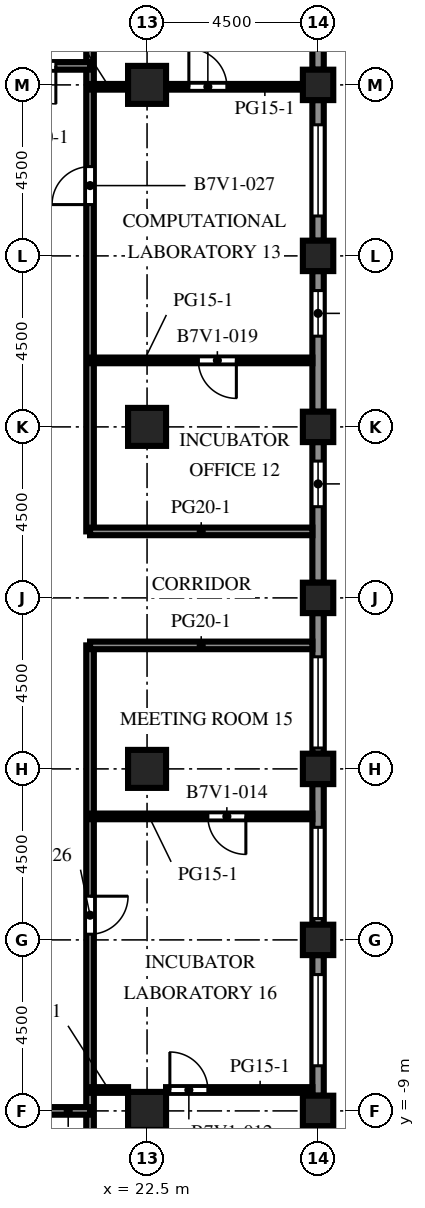
"""IFC4 building model, lengths in metres.
Left out: names, types, materials, properties, quantities, classifications, styles, units other than length and angle.
Written with IfcOpenShell. Run it as: python <this file> out.ifc"""

import sys

from ifc_helpers import new_model, si_unit, direction, frame, frame_2d, origin, origin_2d, place, context, subcontext, project, spatial, rectangle, extrude, element, fill, save


model = new_model("IFC4")
c1 = context("Model", 3, precision=1e-05, world=origin(), true_north=direction((0.0, 1.0)))
c2 = subcontext(c1, "Body", "Model", "MODEL_VIEW")
j1 = project(units=[si_unit("LENGTHUNIT", "METRE"), si_unit("PLANEANGLEUNIT", "RADIAN")], contexts=[c1])
p1 = place(None, origin())
s1 = spatial("IfcSite", under=j1, at=p1, CompositionType="ELEMENT")
p2 = place(p1, origin())
s2 = spatial("IfcBuilding", under=s1, at=p2, CompositionType="ELEMENT")
p3 = place(p2, frame((0.0, 0.0, 252.1)))
s3 = spatial("IfcBuildingStorey", under=s2, at=p3, CompositionType="ELEMENT", Elevation=252.1)
for number, where, z_axis, x_axis in (
    (1, (27.0, -9.0, 0.0), (0.0, 0.0, 1.0), (1.0, 0.0, 0.0)),
    (2, (27.0, -4.5, 0.0), (0.0, 0.0, 1.0), (1.0, 0.0, 0.0)),
    (3, (27.0, 0.0, 0.0), (0.0, 0.0, 1.0), (1.0, 0.0, 0.0)),
    (4, (27.0, 4.5, 0.0), (0.0, 0.0, 1.0), (1.0, 0.0, 0.0)),
    (5, (27.0, 9.0, 0.0), (0.0, 0.0, 1.0), (1.0, 0.0, 0.0)),
    (6, (27.0, 13.5, 0.0), (0.0, 0.0, 1.0), (1.0, 0.0, 0.0)),
    (7, (27.0, 18.0, 0.0), (0.0, 0.0, 1.0), (1.0, 0.0, 0.0)),
):
    element("IfcColumn", number, at=place(p3, frame(where, z_axis=z_axis, x_axis=x_axis)), inside=s3, PredefinedType="COLUMN", context=c2, shape_type="SweptSolid", body=[
        extrude(rectangle(XDim=0.8, YDim=0.8, at=origin_2d()), origin(), (0.0, 0.0, 1.0), 4.1),
    ])
for number, where, z_axis, x_axis in (
    (8, (22.5, -9.0, 0.0), (0.0, 0.0, 1.0), (1.0, 0.0, 0.0)),
    (9, (22.5, 0.0, 0.0), (0.0, 0.0, 1.0), (1.0, 0.0, 0.0)),
    (10, (22.5, 9.0, 0.0), (0.0, 0.0, 1.0), (1.0, 0.0, 0.0)),
    (11, (22.5, 18.0, 0.0), (0.0, 0.0, 1.0), (1.0, 0.0, 0.0)),
):
    element("IfcColumn", number, at=place(p3, frame(where, z_axis=z_axis, x_axis=x_axis)), inside=s3, PredefinedType="COLUMN", context=c2, shape_type="SweptSolid", body=[
        extrude(rectangle(XDim=1.0, YDim=1.0, at=origin_2d()), origin(), (0.0, 0.0, 1.0), 4.1),
    ])
p4 = place(p3, frame((27.0, -9.4, 0.0), z_axis=(0.0, 0.0, 1.0), x_axis=(0.0, -1.0, 0.0)))
e12 = element("IfcWall", 12, at=p4, inside=s3, PredefinedType="SOLIDWALL", context=c2, shape_type="SweptSolid", body=[
    extrude(rectangle(XDim=3.7, YDim=0.3, at=frame_2d((1.85, 0.0))), origin(), (0.0, 0.0, 1.0), 2.85),
])
p5 = place(p4, frame((1.35, 0.0, 0.0)))
e13 = element("IfcOpeningElement", 13, at=p5, cuts=e12, PredefinedType="OPENING", context=c2, shape_type="SweptSolid", body=[
    extrude(rectangle(XDim=1.0, YDim=2.2, at=frame_2d((0.5, 1.1))), frame((0.0, 0.16, 0.0), z_axis=(0.0, -1.0, 0.0), x_axis=(1.0, 0.0, 0.0)), (0.0, 0.0, 1.0), 0.32),
])
p6 = place(p3, frame((27.0, -4.9, 0.0), z_axis=(0.0, 0.0, 1.0), x_axis=(0.0, -1.0, 0.0)))
e14 = element("IfcWall", 14, at=p6, inside=s3, PredefinedType="SOLIDWALL", context=c2, shape_type="SweptSolid", body=[
    extrude(rectangle(XDim=3.7, YDim=0.3, at=frame_2d((1.85, 0.0))), origin(), (0.0, 0.0, 1.0), 2.85),
])
p7 = place(p6, frame((0.512, 0.0, 0.8)))
e15 = element("IfcOpeningElement", 15, at=p7, cuts=e14, PredefinedType="OPENING", context=c2, shape_type="SweptSolid", body=[
    extrude(rectangle(XDim=2.4, YDim=1.7, at=frame_2d((1.2, 0.85))), frame((0.0, 0.16, 0.0), z_axis=(0.0, -1.0, 0.0), x_axis=(1.0, 0.0, 0.0)), (0.0, 0.0, 1.0), 0.32),
])
p8 = place(p3, frame((27.0, -0.4, 0.0), z_axis=(0.0, 0.0, 1.0), x_axis=(0.0, -1.0, 0.0)))
e16 = element("IfcWall", 16, at=p8, inside=s3, PredefinedType="SOLIDWALL", context=c2, shape_type="SweptSolid", body=[
    extrude(rectangle(XDim=3.7, YDim=0.3, at=frame_2d((1.85, 0.0))), origin(), (0.0, 0.0, 1.0), 2.85),
])
p9 = place(p8, frame((1.137, 0.0, 0.8)))
e17 = element("IfcOpeningElement", 17, at=p9, cuts=e16, PredefinedType="OPENING", context=c2, shape_type="SweptSolid", body=[
    extrude(rectangle(XDim=2.4, YDim=1.7, at=frame_2d((1.2, 0.85))), frame((0.0, 0.16, 0.0), z_axis=(0.0, -1.0, 0.0), x_axis=(1.0, 0.0, 0.0)), (0.0, 0.0, 1.0), 0.32),
])
p10 = place(p3, frame((27.0, 4.1, 0.0), z_axis=(0.0, 0.0, 1.0), x_axis=(0.0, -1.0, 0.0)))
e18 = element("IfcWall", 18, at=p10, inside=s3, PredefinedType="SOLIDWALL", context=c2, shape_type="SweptSolid", body=[
    extrude(rectangle(XDim=3.7, YDim=0.3, at=frame_2d((1.85, 0.0))), origin(), (0.0, 0.0, 1.0), 2.85),
])
p11 = place(p10, frame((1.15, 0.0, 0.8)))
e19 = element("IfcOpeningElement", 19, at=p11, cuts=e18, PredefinedType="OPENING", context=c2, shape_type="SweptSolid", body=[
    extrude(rectangle(XDim=2.4, YDim=1.7, at=frame_2d((1.2, 0.85))), frame((0.0, 0.16, 0.0), z_axis=(0.0, -1.0, 0.0), x_axis=(1.0, 0.0, 0.0)), (0.0, 0.0, 1.0), 0.32),
])
p12 = place(p3, frame((27.0, 8.6, 0.0), z_axis=(0.0, 0.0, 1.0), x_axis=(0.0, -1.0, 0.0)))
e20 = element("IfcWall", 20, at=p12, inside=s3, PredefinedType="SOLIDWALL", context=c2, shape_type="SweptSolid", body=[
    extrude(rectangle(XDim=3.7, YDim=0.3, at=frame_2d((1.85, 0.0))), origin(), (0.0, 0.0, 1.0), 2.85),
])
p13 = place(p12, frame((0.5, 0.0, 0.8)))
e21 = element("IfcOpeningElement", 21, at=p13, cuts=e20, PredefinedType="OPENING", context=c2, shape_type="SweptSolid", body=[
    extrude(rectangle(XDim=1.2, YDim=1.7, at=frame_2d((0.6, 0.85))), frame((0.0, 0.16, 0.0), z_axis=(0.0, -1.0, 0.0), x_axis=(1.0, 0.0, 0.0)), (0.0, 0.0, 1.0), 0.32),
])
p14 = place(p3, frame((27.0, 13.1, 0.0), z_axis=(0.0, 0.0, 1.0), x_axis=(0.0, -1.0, 0.0)))
e22 = element("IfcWall", 22, at=p14, inside=s3, PredefinedType="SOLIDWALL", context=c2, shape_type="SweptSolid", body=[
    extrude(rectangle(XDim=3.7, YDim=0.3, at=frame_2d((1.85, 0.0))), origin(), (0.0, 0.0, 1.0), 2.85),
])
p15 = place(p14, frame((0.512, 0.0, 0.8)))
e23 = element("IfcOpeningElement", 23, at=p15, cuts=e22, PredefinedType="OPENING", context=c2, shape_type="SweptSolid", body=[
    extrude(rectangle(XDim=1.2, YDim=1.7, at=frame_2d((0.6, 0.85))), frame((0.0, 0.16, 0.0), z_axis=(0.0, -1.0, 0.0), x_axis=(1.0, 0.0, 0.0)), (0.0, 0.0, 1.0), 0.32),
])
p16 = place(p3, frame((27.0, 17.6, 0.0), z_axis=(0.0, 0.0, 1.0), x_axis=(0.0, -1.0, 0.0)))
e24 = element("IfcWall", 24, at=p16, inside=s3, PredefinedType="SOLIDWALL", context=c2, shape_type="SweptSolid", body=[
    extrude(rectangle(XDim=3.7, YDim=0.3, at=frame_2d((1.85, 0.0))), origin(), (0.0, 0.0, 1.0), 2.85),
])
p17 = place(p16, frame((0.65, 0.0, 0.8)))
e25 = element("IfcOpeningElement", 25, at=p17, cuts=e24, PredefinedType="OPENING", context=c2, shape_type="SweptSolid", body=[
    extrude(rectangle(XDim=2.4, YDim=1.7, at=frame_2d((1.2, 0.85))), frame((0.0, 0.16, 0.0), z_axis=(0.0, -1.0, 0.0), x_axis=(1.0, 0.0, 0.0)), (0.0, 0.0, 1.0), 0.32),
])
p18 = place(p3, frame((27.0, 22.1, 0.0), z_axis=(0.0, 0.0, 1.0), x_axis=(0.0, -1.0, 0.0)))
e26 = element("IfcWall", 26, at=p18, inside=s3, PredefinedType="SOLIDWALL", context=c2, shape_type="SweptSolid", body=[
    extrude(rectangle(XDim=3.7, YDim=0.3, at=frame_2d((1.85, 0.0))), origin(), (0.0, 0.0, 1.0), 2.85),
])
p19 = place(p18, frame((1.35, 0.0, 0.0)))
e27 = element("IfcOpeningElement", 27, at=p19, cuts=e26, PredefinedType="OPENING", context=c2, shape_type="SweptSolid", body=[
    extrude(rectangle(XDim=1.0, YDim=2.2, at=frame_2d((0.5, 1.1))), frame((0.0, 0.16, 0.0), z_axis=(0.0, -1.0, 0.0), x_axis=(1.0, 0.0, 0.0)), (0.0, 0.0, 1.0), 0.32),
])
p20 = place(p3, frame((21.0, 3.25, 0.0), z_axis=(0.0, 0.0, 1.0), x_axis=(0.0, -1.0, 0.0)))
e28 = element("IfcWall", 28, at=p20, inside=s3, PredefinedType="PARTITIONING", context=c2, shape_type="SweptSolid", body=[
    extrude(rectangle(XDim=25.6, YDim=0.2, at=frame_2d((12.8, 0.0))), origin(), (0.0, 0.0, 1.0), 3.65),
])
p21 = place(p20, frame((6.6, 0.0, 0.0)))
e29 = element("IfcOpeningElement", 29, at=p21, cuts=e28, PredefinedType="OPENING", context=c2, shape_type="SweptSolid", body=[
    extrude(rectangle(XDim=1.0, YDim=2.1, at=frame_2d((0.5, 1.05))), frame((0.0, 0.11, 0.0), z_axis=(0.0, -1.0, 0.0), x_axis=(1.0, 0.0, 0.0)), (0.0, 0.0, 1.0), 0.22),
])
p22 = place(p3, frame((21.0, 31.35, 0.0), z_axis=(0.0, 0.0, 1.0), x_axis=(0.0, -1.0, 0.0)))
e30 = element("IfcWall", 30, at=p22, inside=s3, PredefinedType="PARTITIONING", context=c2, shape_type="SweptSolid", body=[
    extrude(rectangle(XDim=25.1, YDim=0.2, at=frame_2d((12.55, 0.0))), origin(), (0.0, 0.0, 1.0), 3.65),
])
p23 = place(p22, frame((15.5, 0.0, 0.0)))
e31 = element("IfcOpeningElement", 31, at=p23, cuts=e30, PredefinedType="OPENING", context=c2, shape_type="SweptSolid", body=[
    extrude(rectangle(XDim=1.0, YDim=2.1, at=frame_2d((0.5, 1.05))), frame((0.0, 0.11, 0.0), z_axis=(0.0, -1.0, 0.0), x_axis=(1.0, 0.0, 0.0)), (0.0, 0.0, 1.0), 0.22),
])
p24 = place(p3, frame((21.0, -9.0, 0.0), z_axis=(0.0, 0.0, 1.0), x_axis=(-1.0, 0.0, 0.0)))
e32 = element("IfcWall", 32, at=p24, inside=s3, PredefinedType="PARTITIONING", context=c2, shape_type="SweptSolid", body=[
    extrude(rectangle(XDim=3.0, YDim=0.2, at=frame_2d((1.5, 0.0))), origin(), (0.0, 0.0, 1.0), 3.65),
])
p25 = place(p24, frame((1.15, 0.0, 0.0)))
e33 = element("IfcOpeningElement", 33, at=p25, cuts=e32, PredefinedType="OPENING", context=c2, shape_type="SweptSolid", body=[
    extrude(rectangle(XDim=1.0, YDim=2.1, at=frame_2d((0.5, 1.05))), frame((0.0, 0.11, 0.0), z_axis=(0.0, -1.0, 0.0), x_axis=(1.0, 0.0, 0.0)), (0.0, 0.0, 1.0), 0.22),
])
p26 = place(p3, frame((21.0, -8.45, 0.0), z_axis=(0.0, 0.0, 1.0), x_axis=(1.0, 0.0, 0.0)))
e34 = element("IfcWall", 34, at=p26, inside=s3, PredefinedType="PARTITIONING", context=c2, shape_type="SweptSolid", body=[
    extrude(rectangle(XDim=1.0, YDim=0.15, at=frame_2d((0.5, 0.0))), origin(), (0.0, 0.0, 1.0), 3.65),
])
p27 = place(p3, frame((26.85, -8.45, 0.0), z_axis=(0.0, 0.0, 1.0), x_axis=(-1.0, 0.0, 0.0)))
e35 = element("IfcWall", 35, at=p27, inside=s3, PredefinedType="PARTITIONING", context=c2, shape_type="SweptSolid", body=[
    extrude(rectangle(XDim=3.85, YDim=0.15, at=frame_2d((1.925, 0.0))), origin(), (0.0, 0.0, 1.0), 3.65),
])
p28 = place(p27, frame((2.75, 0.0, 0.0)))
e36 = element("IfcOpeningElement", 36, at=p28, cuts=e35, PredefinedType="OPENING", context=c2, shape_type="SweptSolid", body=[
    extrude(rectangle(XDim=1.0, YDim=2.1, at=frame_2d((0.5, 1.05))), frame((0.0, 0.085, 0.0), z_axis=(0.0, -1.0, 0.0), x_axis=(1.0, 0.0, 0.0)), (0.0, 0.0, 1.0), 0.17),
])
p29 = place(p3, frame((21.0, -1.25, 0.0), z_axis=(0.0, 0.0, 1.0), x_axis=(1.0, 0.0, 0.0)))
e37 = element("IfcWall", 37, at=p29, inside=s3, PredefinedType="PARTITIONING", context=c2, shape_type="SweptSolid", body=[
    extrude(rectangle(XDim=5.85, YDim=0.15, at=frame_2d((2.925, 0.0))), origin(), (0.0, 0.0, 1.0), 3.65),
])
p30 = place(p29, frame((3.1, 0.0, 0.0)))
e38 = element("IfcOpeningElement", 38, at=p30, cuts=e37, PredefinedType="OPENING", context=c2, shape_type="SweptSolid", body=[
    extrude(rectangle(XDim=1.0, YDim=2.1, at=frame_2d((0.5, 1.05))), frame((0.0, 0.085, 0.0), z_axis=(0.0, -1.0, 0.0), x_axis=(1.0, 0.0, 0.0)), (0.0, 0.0, 1.0), 0.17),
])
for number, where, z_axis, x_axis in (
    (39, (21.0, 3.25, 0.0), (0.0, 0.0, 1.0), (1.0, 0.0, 0.0)),
    (40, (21.0, 6.25, 0.0), (0.0, 0.0, 1.0), (1.0, 0.0, 0.0)),
):
    element("IfcWall", number, at=place(p3, frame(where, z_axis=z_axis, x_axis=x_axis)), inside=s3, PredefinedType="PARTITIONING", context=c2, shape_type="SweptSolid", body=[
        extrude(rectangle(XDim=5.85, YDim=0.2, at=frame_2d((2.925, 0.0))), origin(), (0.0, 0.0, 1.0), 3.65),
    ])
p31 = place(p3, frame((26.85, 10.75, 0.0), z_axis=(0.0, 0.0, 1.0), x_axis=(-1.0, 0.0, 0.0)))
e41 = element("IfcWall", 41, at=p31, inside=s3, PredefinedType="PARTITIONING", context=c2, shape_type="SweptSolid", body=[
    extrude(rectangle(XDim=5.85, YDim=0.15, at=frame_2d((2.925, 0.0))), origin(), (0.0, 0.0, 1.0), 3.65),
])
p32 = place(p31, frame((2.0, 0.0, 0.0)))
e42 = element("IfcOpeningElement", 42, at=p32, cuts=e41, PredefinedType="OPENING", context=c2, shape_type="SweptSolid", body=[
    extrude(rectangle(XDim=1.0, YDim=2.1, at=frame_2d((0.5, 1.05))), frame((0.0, 0.085, 0.0), z_axis=(0.0, -1.0, 0.0), x_axis=(1.0, 0.0, 0.0)), (0.0, 0.0, 1.0), 0.17),
])
p33 = place(p3, frame((21.0, 17.95, 0.0), z_axis=(0.0, 0.0, 1.0), x_axis=(1.0, 0.0, 0.0)))
e43 = element("IfcWall", 43, at=p33, inside=s3, PredefinedType="PARTITIONING", context=c2, shape_type="SweptSolid", body=[
    extrude(rectangle(XDim=1.0, YDim=0.15, at=frame_2d((0.5, 0.0))), origin(), (0.0, 0.0, 1.0), 3.65),
])
p34 = place(p3, frame((23.0, 17.95, 0.0), z_axis=(0.0, 0.0, 1.0), x_axis=(1.0, 0.0, 0.0)))
e44 = element("IfcWall", 44, at=p34, inside=s3, PredefinedType="PARTITIONING", context=c2, shape_type="SweptSolid", body=[
    extrude(rectangle(XDim=3.6, YDim=0.15, at=frame_2d((1.8, 0.0))), origin(), (0.0, 0.0, 1.0), 3.65),
])
p35 = place(p34, frame((0.6, 0.0, 0.0)))
e45 = element("IfcOpeningElement", 45, at=p35, cuts=e44, PredefinedType="OPENING", context=c2, shape_type="SweptSolid", body=[
    extrude(rectangle(XDim=1.0, YDim=2.1, at=frame_2d((0.5, 1.05))), frame((0.0, 0.085, 0.0), z_axis=(0.0, -1.0, 0.0), x_axis=(1.0, 0.0, 0.0)), (0.0, 0.0, 1.0), 0.17),
])
p36 = place(p3, frame((18.0, 18.5, 0.0), z_axis=(0.0, 0.0, 1.0), x_axis=(1.0, 0.0, 0.0)))
e46 = element("IfcWall", 46, at=p36, inside=s3, PredefinedType="PARTITIONING", context=c2, shape_type="SweptSolid", body=[
    extrude(rectangle(XDim=3.0, YDim=0.2, at=frame_2d((1.5, 0.0))), origin(), (0.0, 0.0, 1.0), 3.65),
])
p37 = place(p36, frame((1.1, 0.0, 0.0)))
e47 = element("IfcOpeningElement", 47, at=p37, cuts=e46, PredefinedType="OPENING", context=c2, shape_type="SweptSolid", body=[
    extrude(rectangle(XDim=1.0, YDim=2.1, at=frame_2d((0.5, 1.05))), frame((0.0, 0.11, 0.0), z_axis=(0.0, -1.0, 0.0), x_axis=(1.0, 0.0, 0.0)), (0.0, 0.0, 1.0), 0.22),
])
p38 = place(p7, origin())
e48 = element("IfcWindow", 48, at=p38, inside=s3, PartitioningType="SINGLE_PANEL", PredefinedType="WINDOW", context=c2, shape_type="SweptSolid", body=[
    extrude(rectangle(XDim=2.4, YDim=1.7, at=frame_2d((1.2, 0.85))), frame((0.0, 0.03, 0.0), z_axis=(0.0, -1.0, 0.0), x_axis=(1.0, 0.0, 0.0)), (0.0, 0.0, 1.0), 0.06),
])
fill(e15, e48)
p39 = place(p9, origin())
e49 = element("IfcWindow", 49, at=p39, inside=s3, PartitioningType="SINGLE_PANEL", PredefinedType="WINDOW", context=c2, shape_type="SweptSolid", body=[
    extrude(rectangle(XDim=2.4, YDim=1.7, at=frame_2d((1.2, 0.85))), frame((0.0, 0.03, 0.0), z_axis=(0.0, -1.0, 0.0), x_axis=(1.0, 0.0, 0.0)), (0.0, 0.0, 1.0), 0.06),
])
fill(e17, e49)
p40 = place(p11, origin())
e50 = element("IfcWindow", 50, at=p40, inside=s3, PartitioningType="SINGLE_PANEL", PredefinedType="WINDOW", context=c2, shape_type="SweptSolid", body=[
    extrude(rectangle(XDim=2.4, YDim=1.7, at=frame_2d((1.2, 0.85))), frame((0.0, 0.03, 0.0), z_axis=(0.0, -1.0, 0.0), x_axis=(1.0, 0.0, 0.0)), (0.0, 0.0, 1.0), 0.06),
])
fill(e19, e50)
p41 = place(p13, origin())
e51 = element("IfcWindow", 51, at=p41, inside=s3, PartitioningType="SINGLE_PANEL", PredefinedType="WINDOW", context=c2, shape_type="SweptSolid", body=[
    extrude(rectangle(XDim=1.2, YDim=1.7, at=frame_2d((0.6, 0.85))), frame((0.0, 0.03, 0.0), z_axis=(0.0, -1.0, 0.0), x_axis=(1.0, 0.0, 0.0)), (0.0, 0.0, 1.0), 0.06),
])
fill(e21, e51)
p42 = place(p15, origin())
e52 = element("IfcWindow", 52, at=p42, inside=s3, PartitioningType="SINGLE_PANEL", PredefinedType="WINDOW", context=c2, shape_type="SweptSolid", body=[
    extrude(rectangle(XDim=1.2, YDim=1.7, at=frame_2d((0.6, 0.85))), frame((0.0, 0.03, 0.0), z_axis=(0.0, -1.0, 0.0), x_axis=(1.0, 0.0, 0.0)), (0.0, 0.0, 1.0), 0.06),
])
fill(e23, e52)
p43 = place(p17, origin())
e53 = element("IfcWindow", 53, at=p43, inside=s3, PartitioningType="SINGLE_PANEL", PredefinedType="WINDOW", context=c2, shape_type="SweptSolid", body=[
    extrude(rectangle(XDim=2.4, YDim=1.7, at=frame_2d((1.2, 0.85))), frame((0.0, 0.03, 0.0), z_axis=(0.0, -1.0, 0.0), x_axis=(1.0, 0.0, 0.0)), (0.0, 0.0, 1.0), 0.06),
])
fill(e25, e53)
p44 = place(p28, origin())
e54 = element("IfcDoor", 54, at=p44, inside=s3, OperationType="SINGLE_SWING_RIGHT", PredefinedType="DOOR", context=c2, shape_type="SweptSolid", body=[
    extrude(rectangle(XDim=1.0, YDim=2.1, at=frame_2d((0.5, 1.05))), frame((0.0, 0.025, 0.0), z_axis=(0.0, -1.0, 0.0), x_axis=(1.0, 0.0, 0.0)), (0.0, 0.0, 1.0), 0.05),
])
fill(e36, e54)
p45 = place(p30, origin())
e55 = element("IfcDoor", 55, at=p45, inside=s3, OperationType="SINGLE_SWING_RIGHT", PredefinedType="DOOR", context=c2, shape_type="SweptSolid", body=[
    extrude(rectangle(XDim=1.0, YDim=2.1, at=frame_2d((0.5, 1.05))), frame((0.0, 0.025, 0.0), z_axis=(0.0, -1.0, 0.0), x_axis=(1.0, 0.0, 0.0)), (0.0, 0.0, 1.0), 0.05),
])
fill(e38, e55)
p46 = place(p32, origin())
e56 = element("IfcDoor", 56, at=p46, inside=s3, OperationType="SINGLE_SWING_LEFT", PredefinedType="DOOR", context=c2, shape_type="SweptSolid", body=[
    extrude(rectangle(XDim=1.0, YDim=2.1, at=frame_2d((0.5, 1.05))), frame((0.0, 0.025, 0.0), z_axis=(0.0, -1.0, 0.0), x_axis=(1.0, 0.0, 0.0)), (0.0, 0.0, 1.0), 0.05),
])
fill(e42, e56)
p47 = place(p35, origin())
e57 = element("IfcDoor", 57, at=p47, inside=s3, OperationType="SINGLE_SWING_LEFT", PredefinedType="DOOR", context=c2, shape_type="SweptSolid", body=[
    extrude(rectangle(XDim=1.0, YDim=2.1, at=frame_2d((0.5, 1.05))), frame((0.0, 0.025, 0.0), z_axis=(0.0, -1.0, 0.0), x_axis=(1.0, 0.0, 0.0)), (0.0, 0.0, 1.0), 0.05),
])
fill(e45, e57)
p48 = place(p37, origin())
e58 = element("IfcDoor", 58, at=p48, inside=s3, OperationType="SINGLE_SWING_RIGHT", PredefinedType="DOOR", context=c2, shape_type="SweptSolid", body=[
    extrude(rectangle(XDim=1.0, YDim=2.1, at=frame_2d((0.5, 1.05))), frame((0.0, 0.025, 0.0), z_axis=(0.0, -1.0, 0.0), x_axis=(1.0, 0.0, 0.0)), (0.0, 0.0, 1.0), 0.05),
])
fill(e47, e58)
p49 = place(p21, origin())
e59 = element("IfcDoor", 59, at=p49, inside=s3, OperationType="SINGLE_SWING_LEFT", PredefinedType="DOOR", context=c2, shape_type="SweptSolid", body=[
    extrude(rectangle(XDim=1.0, YDim=2.1, at=frame_2d((0.5, 1.05))), frame((0.0, 0.025, 0.0), z_axis=(0.0, -1.0, 0.0), x_axis=(1.0, 0.0, 0.0)), (0.0, 0.0, 1.0), 0.05),
])
fill(e29, e59)
p50 = place(p23, origin())
e60 = element("IfcDoor", 60, at=p50, inside=s3, OperationType="SINGLE_SWING_RIGHT", PredefinedType="DOOR", context=c2, shape_type="SweptSolid", body=[
    extrude(rectangle(XDim=1.0, YDim=2.1, at=frame_2d((0.5, 1.05))), frame((0.0, 0.025, 0.0), z_axis=(0.0, -1.0, 0.0), x_axis=(1.0, 0.0, 0.0)), (0.0, 0.0, 1.0), 0.05),
])
fill(e31, e60)
save(model, sys.argv[1])
